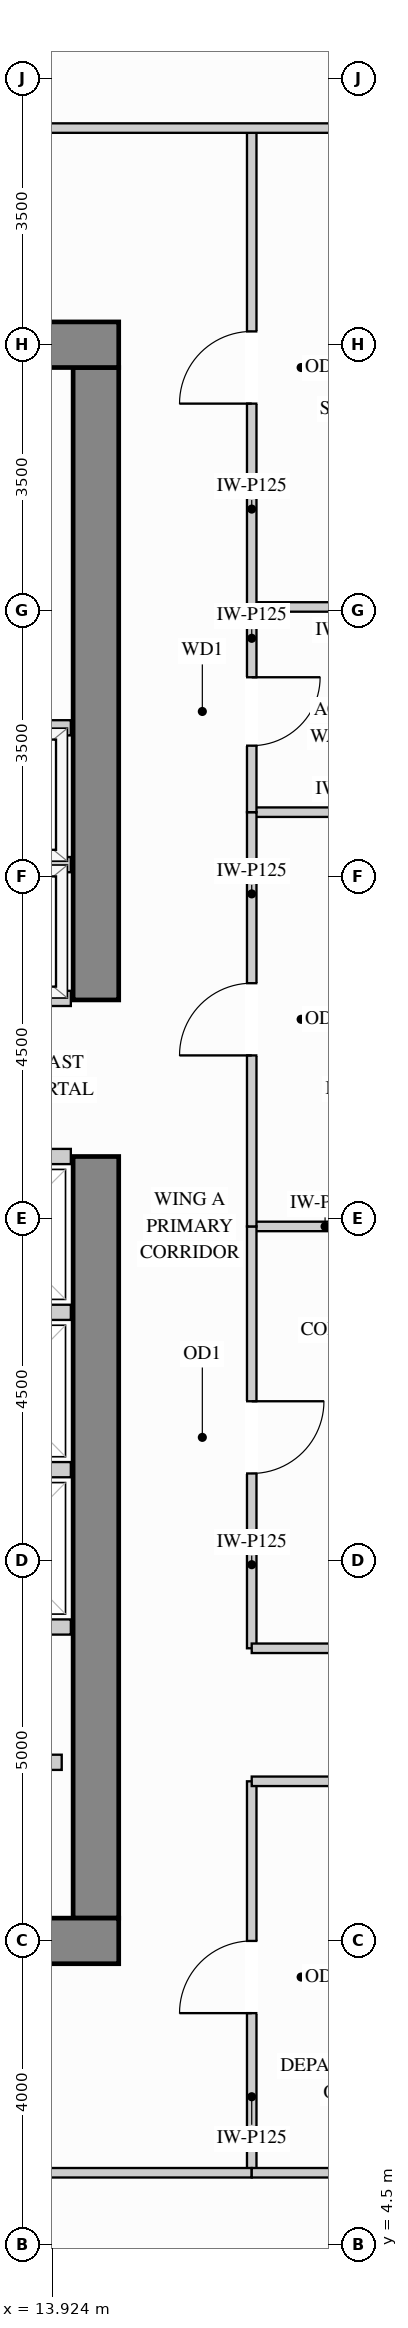
"""IFC4 building model, lengths in metres.
Left out: names, types, materials, properties, quantities, classifications, styles, units other than length and angle.
Written with IfcOpenShell. Run it as: python <this file> out.ifc"""

import sys

from ifc_helpers import new_model, si_unit, direction, frame, frame_2d, origin, place, context, subcontext, project, spatial, rectangle, extrude, source, transform, mapped, element, fill, save


model = new_model("IFC4")
c1 = context("Model", 3, precision=1e-05, world=origin(), true_north=direction((0.0, 1.0)))
c2 = subcontext(c1, "Body", "Model", "MODEL_VIEW")
j1 = project(units=[si_unit("LENGTHUNIT", "METRE"), si_unit("PLANEANGLEUNIT", "RADIAN")], contexts=[c1])
p1 = place(None, origin())
s1 = spatial("IfcSite", under=j1, at=p1, CompositionType="ELEMENT")
p2 = place(p1, origin())
s2 = spatial("IfcBuilding", under=s1, at=p2, CompositionType="ELEMENT")
p3 = place(p2, frame((0.0, 0.0, 146.7)))
s3 = spatial("IfcBuildingStorey", under=s2, at=p3, CompositionType="ELEMENT", Elevation=146.7)
m1 = source(origin(), c2, "Body", "SweptSolid", [
    extrude(rectangle(XDim=10.02, YDim=0.6, at=frame_2d((5.01, 0.0))), origin(), (0.0, 0.0, 1.0), 3.4),
])
p4 = place(p3, frame((14.5, 8.8, 0.0), z_axis=(0.0, 0.0, 1.0), x_axis=(0.0, 1.0, 0.0)))
e1 = element("IfcWall", 1, at=p4, inside=s3, PredefinedType="SHEAR", context=c2, shape_type="MappedRepresentation", body=[
    mapped(m1, transform((0.0, 0.0, 0.0), x_axis=(1.0, 0.0, 0.0), y_axis=(0.0, 1.0, 0.0), z_axis=(0.0, 0.0, 1.0))),
])
m2 = source(origin(), c2, "Body", "SweptSolid", [
    extrude(rectangle(XDim=8.32, YDim=0.6, at=frame_2d((4.16, 0.0))), origin(), (0.0, 0.0, 1.0), 3.4),
])
p5 = place(p3, frame((14.5, 20.88, 0.0), z_axis=(0.0, 0.0, 1.0), x_axis=(0.0, 1.0, 0.0)))
e2 = element("IfcWall", 2, at=p5, inside=s3, PredefinedType="SHEAR", context=c2, shape_type="MappedRepresentation", body=[
    mapped(m2, transform((0.0, 0.0, 0.0), x_axis=(1.0, 0.0, 0.0), y_axis=(0.0, 1.0, 0.0), z_axis=(0.0, 0.0, 1.0))),
])
m3 = source(origin(), c2, "Body", "SweptSolid", [
    extrude(rectangle(XDim=10.6, YDim=0.6, at=frame_2d((5.3, 0.0))), origin(), (0.0, 0.0, 1.0), 3.4),
])
for number, where, z_axis, x_axis in (
    (3, (4.2, 29.5, 0.0), (0.0, 0.0, 1.0), (1.0, 0.0, 0.0)),
    (4, (4.2, 8.5, 0.0), (0.0, 0.0, 1.0), (1.0, 0.0, 0.0)),
):
    element("IfcWall", number, at=place(p3, frame(where, z_axis=z_axis, x_axis=x_axis)), inside=s3, PredefinedType="SHEAR", context=c2, shape_type="MappedRepresentation", body=[
        mapped(m3, transform((0.0, 0.0, 0.0), x_axis=(1.0, 0.0, 0.0), y_axis=(0.0, 1.0, 0.0), z_axis=(0.0, 0.0, 1.0))),
    ])
m4 = source(origin(), c2, "Body", "SweptSolid", [
    extrude(rectangle(XDim=1.93, YDim=0.125, at=frame_2d((0.965, 0.0))), origin(), (0.0, 0.0, 1.0), 2.773),
])
p6 = place(p3, frame((16.55, 17.9, 0.0), z_axis=(0.0, 0.0, 1.0), x_axis=(1.0, 0.0, 0.0)))
e5 = element("IfcWall", 5, at=p6, inside=s3, PredefinedType="PARTITIONING", context=c2, shape_type="MappedRepresentation", body=[
    mapped(m4, transform((0.0, 0.0, 0.0), x_axis=(1.0, 0.0, 0.0), y_axis=(0.0, 1.0, 0.0), z_axis=(0.0, 0.0, 1.0))),
])
m5 = source(origin(), c2, "Body", "SweptSolid", [
    extrude(rectangle(XDim=2.598, YDim=0.125, at=frame_2d((1.299, 0.0))), origin(), (0.0, 0.0, 1.0), 3.385),
])
for number, where, z_axis, x_axis in (
    (6, (16.55, 23.35, 0.0), (0.0, 0.0, 1.0), (1.0, 0.0, 0.0)),
    (7, (16.55, 26.05, 0.0), (0.0, 0.0, 1.0), (1.0, 0.0, 0.0)),
):
    element("IfcWall", number, at=place(p3, frame(where, z_axis=z_axis, x_axis=x_axis)), inside=s3, PredefinedType="PARTITIONING", context=c2, shape_type="MappedRepresentation", body=[
        mapped(m5, transform((0.0, 0.0, 0.0), x_axis=(1.0, 0.0, 0.0), y_axis=(0.0, 1.0, 0.0), z_axis=(0.0, 0.0, 1.0))),
    ])
p7 = place(p3, frame((16.55, 12.35, 0.0), z_axis=(0.0, 0.0, 1.0), x_axis=(0.0, 1.0, 0.0)))
e8 = element("IfcWall", 8, at=p7, inside=s3, PredefinedType="PARTITIONING", context=c2, shape_type="SweptSolid", body=[
    extrude(rectangle(XDim=5.55, YDim=0.125, at=frame_2d((2.775, 0.0))), origin(), (0.0, 0.0, 1.0), 3.385),
])
p8 = place(p7, frame((2.3, 0.0, 0.0)))
e9 = element("IfcOpeningElement", 9, at=p8, cuts=e8, PredefinedType="OPENING", context=c2, shape_type="SweptSolid", body=[
    extrude(rectangle(XDim=0.95, YDim=2.15, at=frame_2d((0.475, 1.075))), frame((0.0, 0.073, 0.0), z_axis=(0.0, -1.0, 0.0), x_axis=(1.0, 0.0, 0.0)), (0.0, 0.0, 1.0), 0.145),
])
p9 = place(p3, frame((16.55, 17.9, 0.0), z_axis=(0.0, 0.0, 1.0), x_axis=(0.0, 1.0, 0.0)))
e10 = element("IfcWall", 10, at=p9, inside=s3, PredefinedType="PARTITIONING", context=c2, shape_type="SweptSolid", body=[
    extrude(rectangle(XDim=5.45, YDim=0.125, at=frame_2d((2.725, 0.0))), origin(), (0.0, 0.0, 1.0), 3.385),
])
p10 = place(p9, frame((2.25, 0.0, 0.0)))
e11 = element("IfcOpeningElement", 11, at=p10, cuts=e10, PredefinedType="OPENING", context=c2, shape_type="SweptSolid", body=[
    extrude(rectangle(XDim=0.95, YDim=2.15, at=frame_2d((0.475, 1.075))), frame((0.0, 0.073, 0.0), z_axis=(0.0, -1.0, 0.0), x_axis=(1.0, 0.0, 0.0)), (0.0, 0.0, 1.0), 0.145),
])
p11 = place(p3, frame((16.55, 26.05, 0.0), z_axis=(0.0, 0.0, 1.0), x_axis=(0.0, 1.0, 0.0)))
e12 = element("IfcWall", 12, at=p11, inside=s3, PredefinedType="PARTITIONING", context=c2, shape_type="SweptSolid", body=[
    extrude(rectangle(XDim=6.3, YDim=0.125, at=frame_2d((3.15, 0.0))), origin(), (0.0, 0.0, 1.0), 3.385),
])
p12 = place(p11, frame((2.675, 0.0, 0.0)))
e13 = element("IfcOpeningElement", 13, at=p12, cuts=e12, PredefinedType="OPENING", context=c2, shape_type="SweptSolid", body=[
    extrude(rectangle(XDim=0.95, YDim=2.15, at=frame_2d((0.475, 1.075))), frame((0.0, 0.073, 0.0), z_axis=(0.0, -1.0, 0.0), x_axis=(1.0, 0.0, 0.0)), (0.0, 0.0, 1.0), 0.145),
])
p13 = place(p3, frame((16.55, 5.45, 0.0), z_axis=(0.0, 0.0, 1.0), x_axis=(0.0, 1.0, 0.0)))
e14 = element("IfcWall", 14, at=p13, inside=s3, PredefinedType="PARTITIONING", context=c2, shape_type="SweptSolid", body=[
    extrude(rectangle(XDim=5.15, YDim=0.125, at=frame_2d((2.575, 0.0))), origin(), (0.0, 0.0, 1.0), 3.385),
])
p14 = place(p13, frame((2.1, 0.0, 0.0)))
e15 = element("IfcOpeningElement", 15, at=p14, cuts=e14, PredefinedType="OPENING", context=c2, shape_type="SweptSolid", body=[
    extrude(rectangle(XDim=0.95, YDim=2.15, at=frame_2d((0.475, 1.075))), frame((0.0, 0.073, 0.0), z_axis=(0.0, -1.0, 0.0), x_axis=(1.0, 0.0, 0.0)), (0.0, 0.0, 1.0), 0.145),
])
p15 = place(p3, frame((16.55, 23.35, 0.0), z_axis=(0.0, 0.0, 1.0), x_axis=(0.0, 1.0, 0.0)))
e16 = element("IfcWall", 16, at=p15, inside=s3, PredefinedType="PARTITIONING", context=c2, shape_type="SweptSolid", body=[
    extrude(rectangle(XDim=2.7, YDim=0.125, at=frame_2d((1.35, 0.0))), origin(), (0.0, 0.0, 1.0), 3.385),
])
p16 = place(p15, frame((0.875, 0.0, 0.0)))
e17 = element("IfcOpeningElement", 17, at=p16, cuts=e16, PredefinedType="OPENING", context=c2, shape_type="SweptSolid", body=[
    extrude(rectangle(XDim=0.9, YDim=2.15, at=frame_2d((0.45, 1.075))), frame((0.0, 0.073, 0.0), z_axis=(0.0, -1.0, 0.0), x_axis=(1.0, 0.0, 0.0)), (0.0, 0.0, 1.0), 0.145),
])
m6 = source(origin(), c2, "Body", "SweptSolid", [
    extrude(rectangle(XDim=5.798, YDim=0.125, at=frame_2d((2.899, 0.0))), origin(), (0.0, 0.0, 1.0), 3.385),
])
p17 = place(p3, frame((13.35, 32.35, 0.0), z_axis=(0.0, 0.0, 1.0), x_axis=(1.0, 0.0, 0.0)))
e18 = element("IfcWall", 18, at=p17, inside=s3, PredefinedType="PARTITIONING", context=c2, shape_type="MappedRepresentation", body=[
    mapped(m6, transform((0.0, 0.0, 0.0), x_axis=(1.0, 0.0, 0.0), y_axis=(0.0, 1.0, 0.0), z_axis=(0.0, 0.0, 1.0))),
])
m7 = source(origin(), c2, "Body", "SweptSolid", [
    extrude(rectangle(XDim=2.95, YDim=0.125, at=frame_2d((1.475, 0.0))), origin(), (0.0, 0.0, 1.0), 3.385),
])
for number, where, z_axis, x_axis in (
    (19, (16.55, 12.35, 0.0), (0.0, 0.0, 1.0), (1.0, 0.0, 0.0)),
    (20, (16.55, 10.6, 0.0), (0.0, 0.0, 1.0), (1.0, 0.0, 0.0)),
):
    element("IfcWall", number, at=place(p3, frame(where, z_axis=z_axis, x_axis=x_axis)), inside=s3, PredefinedType="PARTITIONING", context=c2, shape_type="MappedRepresentation", body=[
        mapped(m7, transform((0.0, 0.0, 0.0), x_axis=(1.0, 0.0, 0.0), y_axis=(0.0, 1.0, 0.0), z_axis=(0.0, 0.0, 1.0))),
    ])
p18 = place(p3, frame((2.45, 5.45, 0.0), z_axis=(0.0, 0.0, 1.0), x_axis=(1.0, 0.0, 0.0)))
e21 = element("IfcWall", 21, at=p18, inside=s3, PredefinedType="PARTITIONING", context=c2, shape_type="SweptSolid", body=[
    extrude(rectangle(XDim=14.1, YDim=0.125, at=frame_2d((7.05, 0.0))), origin(), (0.0, 0.0, 1.0), 3.385),
])
p19 = place(p18, frame((6.575, 0.0, 0.0)))
e22 = element("IfcOpeningElement", 22, at=p19, cuts=e21, PredefinedType="OPENING", context=c2, shape_type="SweptSolid", body=[
    extrude(rectangle(XDim=0.95, YDim=2.15, at=frame_2d((0.475, 1.075))), frame((0.0, 0.073, 0.0), z_axis=(0.0, -1.0, 0.0), x_axis=(1.0, 0.0, 0.0)), (0.0, 0.0, 1.0), 0.145),
])
m8 = source(origin(), c2, "Body", "SweptSolid", [
    extrude(rectangle(XDim=2.6, YDim=0.125, at=frame_2d((1.3, 0.0))), origin(), (0.0, 0.0, 1.0), 3.385),
])
p20 = place(p3, frame((16.55, 5.45, 0.0), z_axis=(0.0, 0.0, 1.0), x_axis=(1.0, 0.0, 0.0)))
e23 = element("IfcWall", 23, at=p20, inside=s3, PredefinedType="PARTITIONING", context=c2, shape_type="MappedRepresentation", body=[
    mapped(m8, transform((0.0, 0.0, 0.0), x_axis=(1.0, 0.0, 0.0), y_axis=(0.0, 1.0, 0.0), z_axis=(0.0, 0.0, 1.0))),
])
m9 = source(origin(), c2, "Body", "SweptSolid", [
    extrude(rectangle(XDim=1.63, YDim=0.2, at=frame_2d((0.815, 0.0))), origin(), (0.0, 0.0, 1.0), 3.385),
])
p21 = place(p3, frame((12.42, 10.85, 0.0), z_axis=(0.0, 0.0, 1.0), x_axis=(1.0, 0.0, 0.0)))
e24 = element("IfcWall", 24, at=p21, inside=s3, PredefinedType="PARTITIONING", context=c2, shape_type="MappedRepresentation", body=[
    mapped(m9, transform((0.0, 0.0, 0.0), x_axis=(1.0, 0.0, 0.0), y_axis=(0.0, 1.0, 0.0), z_axis=(0.0, 0.0, 1.0))),
])
m10 = source(origin(), c2, "Body", "SweptSolid", [
    extrude(rectangle(XDim=2.34, YDim=0.2, at=frame_2d((1.17, 0.0))), origin(), (0.0, 0.0, 1.0), 3.385),
])
for number, where, z_axis, x_axis in (
    (25, (11.83, 22.66, 0.0), (0.0, 0.0, 1.0), (1.0, 0.0, 0.0)),
    (26, (11.83, 20.9, 0.0), (0.0, 0.0, 1.0), (1.0, 0.0, 0.0)),
    (27, (11.83, 24.46, 0.0), (0.0, 0.0, 1.0), (1.0, 0.0, 0.0)),
):
    element("IfcWall", number, at=place(p3, frame(where, z_axis=z_axis, x_axis=x_axis)), inside=s3, PredefinedType="PARTITIONING", context=c2, shape_type="MappedRepresentation", body=[
        mapped(m10, transform((0.0, 0.0, 0.0), x_axis=(1.0, 0.0, 0.0), y_axis=(0.0, 1.0, 0.0), z_axis=(0.0, 0.0, 1.0))),
    ])
m11 = source(origin(), c2, "Body", "SweptSolid", [
    extrude(rectangle(XDim=1.94, YDim=0.2, at=frame_2d((0.97, 0.0))), origin(), (0.0, 0.0, 1.0), 3.385),
])
for number, where, z_axis, x_axis in (
    (28, (12.23, 14.7, 0.0), (0.0, 0.0, 1.0), (1.0, 0.0, 0.0)),
    (29, (12.23, 12.63, 0.0), (0.0, 0.0, 1.0), (1.0, 0.0, 0.0)),
    (30, (12.23, 16.77, 0.0), (0.0, 0.0, 1.0), (1.0, 0.0, 0.0)),
    (31, (12.23, 18.82, 0.0), (0.0, 0.0, 1.0), (1.0, 0.0, 0.0)),
):
    element("IfcWall", number, at=place(p3, frame(where, z_axis=z_axis, x_axis=x_axis)), inside=s3, PredefinedType="PARTITIONING", context=c2, shape_type="MappedRepresentation", body=[
        mapped(m11, transform((0.0, 0.0, 0.0), x_axis=(1.0, 0.0, 0.0), y_axis=(0.0, 1.0, 0.0), z_axis=(0.0, 0.0, 1.0))),
    ])
m12 = source(origin(), c2, "Body", "SweptSolid", [
    extrude(rectangle(XDim=0.95, YDim=2.15, at=frame_2d((0.475, 1.075))), frame((0.0, 0.025, 0.0), z_axis=(0.0, -1.0, 0.0), x_axis=(1.0, 0.0, 0.0)), (0.0, 0.0, 1.0), 0.05),
])
p22 = place(p14, origin())
e32 = element("IfcDoor", 32, at=p22, inside=s3, OperationType="SINGLE_SWING_LEFT", PredefinedType="DOOR", context=c2, shape_type="MappedRepresentation", body=[
    mapped(m12, transform((0.0, 0.0, 0.0), x_axis=(1.0, 0.0, 0.0), y_axis=(0.0, 1.0, 0.0), z_axis=(0.0, 0.0, 1.0))),
])
fill(e15, e32)
p23 = place(p8, origin())
e33 = element("IfcDoor", 33, at=p23, inside=s3, OperationType="SINGLE_SWING_RIGHT", PredefinedType="DOOR", context=c2, shape_type="MappedRepresentation", body=[
    mapped(m12, transform((0.0, 0.0, 0.0), x_axis=(1.0, 0.0, 0.0), y_axis=(0.0, 1.0, 0.0), z_axis=(0.0, 0.0, 1.0))),
])
fill(e9, e33)
p24 = place(p10, origin())
e34 = element("IfcDoor", 34, at=p24, inside=s3, OperationType="SINGLE_SWING_LEFT", PredefinedType="DOOR", context=c2, shape_type="MappedRepresentation", body=[
    mapped(m12, transform((0.0, 0.0, 0.0), x_axis=(1.0, 0.0, 0.0), y_axis=(0.0, 1.0, 0.0), z_axis=(0.0, 0.0, 1.0))),
])
fill(e11, e34)
p25 = place(p12, origin())
e35 = element("IfcDoor", 35, at=p25, inside=s3, OperationType="SINGLE_SWING_LEFT", PredefinedType="DOOR", context=c2, shape_type="MappedRepresentation", body=[
    mapped(m12, transform((0.0, 0.0, 0.0), x_axis=(1.0, 0.0, 0.0), y_axis=(0.0, 1.0, 0.0), z_axis=(0.0, 0.0, 1.0))),
])
fill(e13, e35)
m13 = source(origin(), c2, "Body", "SweptSolid", [
    extrude(rectangle(XDim=0.9, YDim=2.15, at=frame_2d((0.45, 1.075))), frame((0.0, 0.025, 0.0), z_axis=(0.0, -1.0, 0.0), x_axis=(1.0, 0.0, 0.0)), (0.0, 0.0, 1.0), 0.05),
])
p26 = place(p16, origin())
e36 = element("IfcDoor", 36, at=p26, inside=s3, OperationType="SINGLE_SWING_RIGHT", PredefinedType="DOOR", context=c2, shape_type="MappedRepresentation", body=[
    mapped(m13, transform((0.0, 0.0, 0.0), x_axis=(1.0, 0.0, 0.0), y_axis=(0.0, 1.0, 0.0), z_axis=(0.0, 0.0, 1.0))),
])
fill(e17, e36)
save(model, sys.argv[1])
